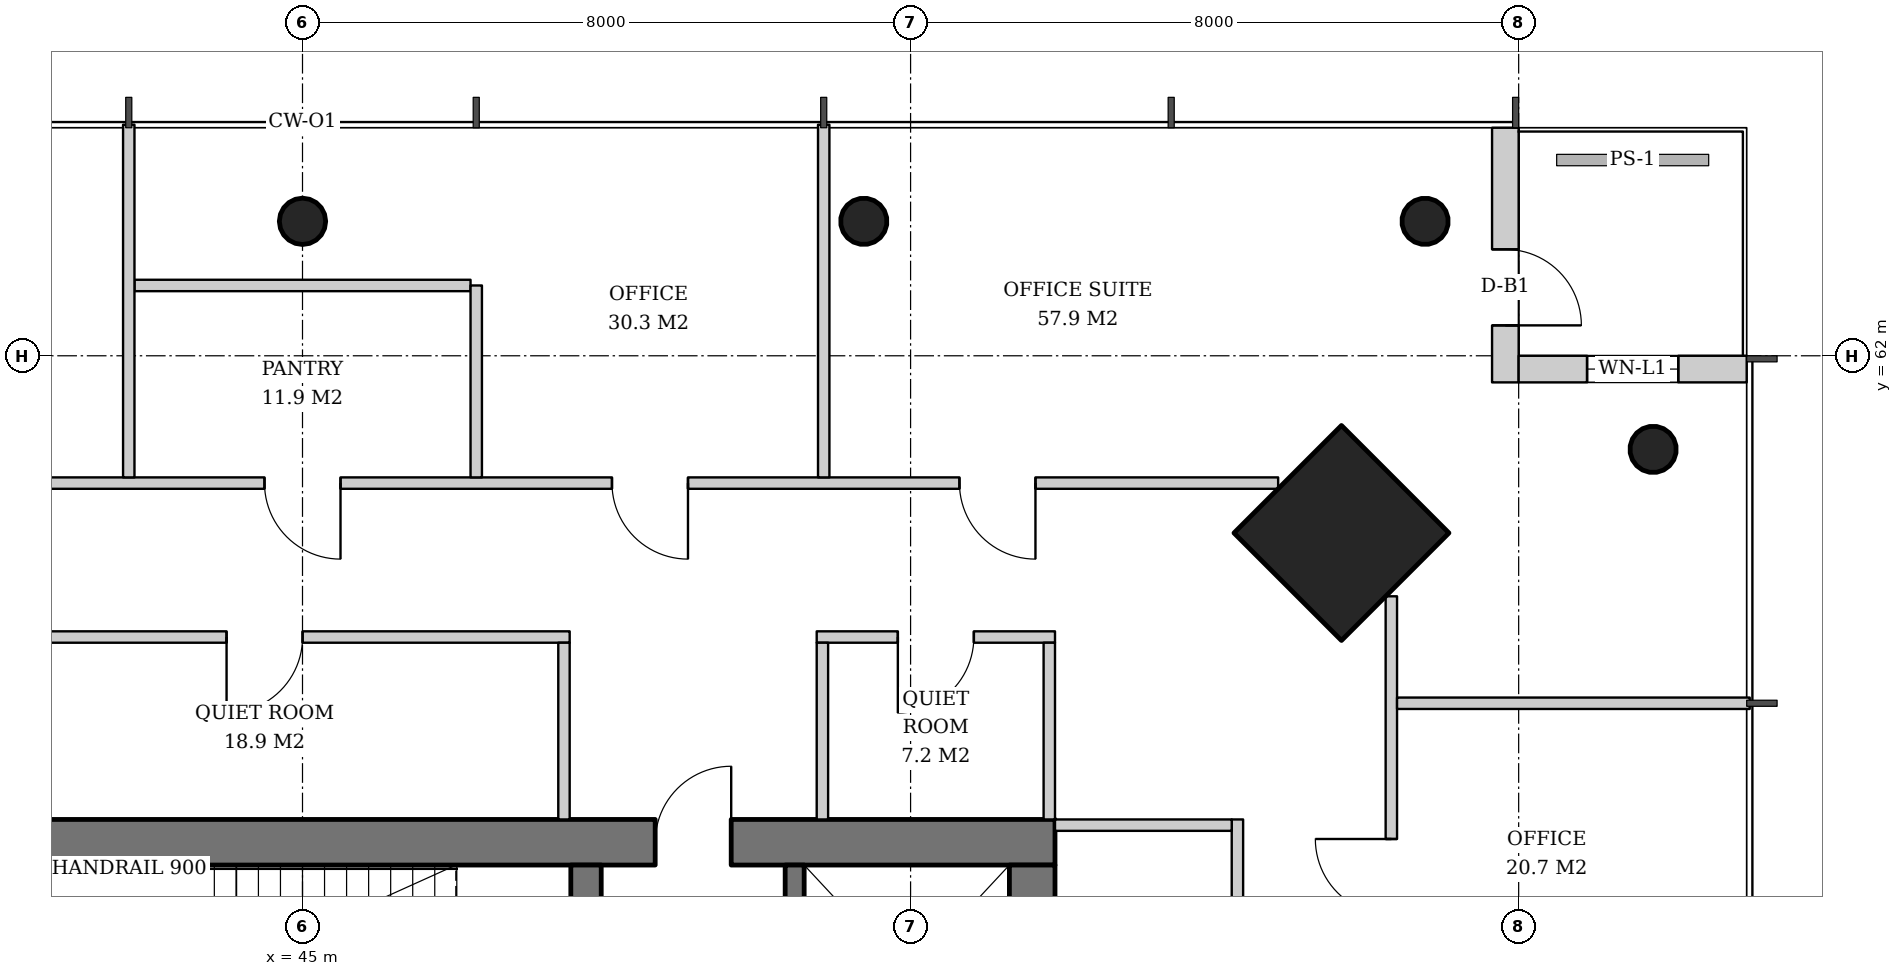
"""IFC4 building model, lengths in metres.
Left out: names, types, materials, properties, quantities, classifications, styles, units other than length and angle.
Written with IfcOpenShell. Run it as: python <this file> out.ifc"""

import sys

from ifc_helpers import new_model, si_unit, direction, frame, frame_2d, origin, origin_2d, place, context, subcontext, project, spatial, rectangle, hollow_circle, extrude, element, fill, save


model = new_model("IFC4")
c1 = context("Model", 3, precision=1e-05, world=origin(), true_north=direction((0.0, 1.0)))
c2 = subcontext(c1, "Body", "Model", "MODEL_VIEW")
j1 = project(units=[si_unit("LENGTHUNIT", "METRE"), si_unit("PLANEANGLEUNIT", "RADIAN")], contexts=[c1])
p1 = place(None, origin())
s1 = spatial("IfcSite", under=j1, at=p1, CompositionType="ELEMENT")
p2 = place(p1, origin())
s2 = spatial("IfcBuilding", under=s1, at=p2, CompositionType="ELEMENT")
p3 = place(p2, frame((0.0, 0.0, 214.8)))
s3 = spatial("IfcBuildingStorey", under=s2, at=p3, CompositionType="ELEMENT", Elevation=214.8)
p4 = place(p3, frame((58.707, 59.707, 0.0), z_axis=(-0.031898107953, -0.031898107953, 0.998981992539), x_axis=(0.707106781187, -0.707106781187, 0.0)))
e1 = element("IfcColumn", 1, at=p4, inside=s3, PredefinedType="COLUMN", context=c2, shape_type="SweptSolid", body=[
    extrude(rectangle(XDim=2.0, YDim=2.0, at=origin_2d()), origin(), (0.0, 0.0, 1.0), 3.804),
])
for number, where, z_axis, x_axis in (
    (2, (62.807, 60.807, 0.0), (-0.032, -0.032, 0.999), (0.707, -0.707, 0.0)),
    (3, (59.807, 63.807, 0.0), (-0.032, -0.032, 0.999), (0.707, -0.707, 0.0)),
):
    element("IfcColumn", number, at=place(p3, frame(where, z_axis=z_axis, x_axis=x_axis)), inside=s3, PredefinedType="COLUMN", context=c2, shape_type="SweptSolid", body=[
        extrude(hollow_circle(Radius=0.305, WallThickness=0.025, at=origin_2d()), origin(), (0.0, 0.0, 1.0), 3.804),
    ])
p5 = place(p3, frame((52.404, 63.807, 0.0), z_axis=(-0.015987237665, -0.031910269556, 0.999362868496), x_axis=(0.894067115991, -0.447933021895, 0.0)))
e4 = element("IfcColumn", 4, at=p5, inside=s3, PredefinedType="COLUMN", context=c2, shape_type="SweptSolid", body=[
    extrude(hollow_circle(Radius=0.305, WallThickness=0.025, at=origin_2d()), origin(), (0.0, 0.0, 1.0), 3.802),
])
p6 = place(p3, frame((45.0, 63.807, 0.0), z_axis=(0.0, -0.031914348339, 0.999490607445), x_axis=(1.0, 0.0, 0.0)))
e5 = element("IfcColumn", 5, at=p6, inside=s3, PredefinedType="COLUMN", context=c2, shape_type="SweptSolid", body=[
    extrude(hollow_circle(Radius=0.305, WallThickness=0.025, at=origin_2d()), origin(), (0.0, 0.0, 1.0), 3.802),
])
p7 = place(p3, frame((35.1, 55.6, 0.0), z_axis=(0.0, 0.0, 1.0), x_axis=(1.0, 0.0, 0.0)))
e6 = element("IfcWall", 6, at=p7, inside=s3, PredefinedType="SHEAR", context=c2, shape_type="SweptSolid", body=[
    extrude(rectangle(XDim=19.8, YDim=0.6, at=frame_2d((9.9, 0.0))), origin(), (0.0, 0.0, 1.0), 3.8),
])
p8 = place(p7, frame((14.54, 0.0, 0.0)))
e7 = element("IfcOpeningElement", 7, at=p8, cuts=e6, PredefinedType="OPENING", context=c2, shape_type="SweptSolid", body=[
    extrude(rectangle(XDim=1.0, YDim=2.1, at=frame_2d((0.5, 1.05))), frame((0.0, 0.31, 0.0), z_axis=(0.0, -1.0, 0.0), x_axis=(1.0, 0.0, 0.0)), (0.0, 0.0, 1.0), 0.62),
])
p9 = place(p7, frame((1.024, 0.0, 0.0)))
e8 = element("IfcOpeningElement", 8, at=p9, cuts=e6, PredefinedType="OPENING", context=c2, shape_type="SweptSolid", body=[
    extrude(rectangle(XDim=1.0, YDim=2.1, at=frame_2d((0.5, 1.05))), frame((0.0, 0.31, 0.0), z_axis=(0.0, -1.0, 0.0), x_axis=(1.0, 0.0, 0.0)), (0.0, 0.0, 1.0), 0.62),
])
p10 = place(p7, frame((3.262, 0.0, 0.0)))
e9 = element("IfcOpeningElement", 9, at=p10, cuts=e6, PredefinedType="OPENING", context=c2, shape_type="SweptSolid", body=[
    extrude(rectangle(XDim=1.0, YDim=2.1, at=frame_2d((0.5, 1.05))), frame((0.0, 0.31, 0.0), z_axis=(0.0, -1.0, 0.0), x_axis=(1.0, 0.0, 0.0)), (0.0, 0.0, 1.0), 0.62),
])
p11 = place(p3, frame((54.6, 36.7, 0.0), z_axis=(0.0, 0.0, 1.0), x_axis=(0.0, 1.0, 0.0)))
e10 = element("IfcWall", 10, at=p11, inside=s3, PredefinedType="SHEAR", context=c2, shape_type="SweptSolid", body=[
    extrude(rectangle(XDim=18.6, YDim=0.6, at=frame_2d((9.3, 0.0))), origin(), (0.0, 0.0, 1.0), 3.8),
])
p12 = place(p11, frame((8.4, 0.0, 0.0)))
e11 = element("IfcOpeningElement", 11, at=p12, cuts=e10, PredefinedType="OPENING", context=c2, shape_type="SweptSolid", body=[
    extrude(rectangle(XDim=1.8, YDim=2.4, at=frame_2d((0.9, 1.2))), frame((0.0, 0.31, 0.0), z_axis=(0.0, -1.0, 0.0), x_axis=(1.0, 0.0, 0.0)), (0.0, 0.0, 1.0), 0.62),
])
p13 = place(p3, frame((48.73, 52.4, 0.0), z_axis=(0.0, 0.0, 1.0), x_axis=(0.0, 1.0, 0.0)))
e12 = element("IfcWall", 12, at=p13, inside=s3, PredefinedType="SHEAR", context=c2, shape_type="SweptSolid", body=[
    extrude(rectangle(XDim=2.9, YDim=0.4, at=frame_2d((1.45, 0.0))), origin(), (0.0, 0.0, 1.0), 3.8),
])
p14 = place(p13, frame((0.3, 0.0, 0.0)))
e13 = element("IfcOpeningElement", 13, at=p14, cuts=e12, PredefinedType="OPENING", context=c2, shape_type="SweptSolid", body=[
    extrude(rectangle(XDim=1.0, YDim=2.1, at=frame_2d((0.5, 1.05))), frame((0.0, 0.21, 0.0), z_axis=(0.0, -1.0, 0.0), x_axis=(1.0, 0.0, 0.0)), (0.0, 0.0, 1.0), 0.42),
])
p15 = place(p3, frame((60.825, 65.0, 0.0), z_axis=(0.0, 0.0, 1.0), x_axis=(0.0, -1.0, 0.0)))
e14 = element("IfcWall", 14, at=p15, inside=s3, PredefinedType="SOLIDWALL", context=c2, shape_type="SweptSolid", body=[
    extrude(rectangle(XDim=3.35, YDim=0.35, at=frame_2d((1.675, 0.0))), origin(), (0.0, 0.0, 1.0), 3.62),
])
p16 = place(p15, frame((1.6, 0.0, 0.0)))
e15 = element("IfcOpeningElement", 15, at=p16, cuts=e14, PredefinedType="OPENING", context=c2, shape_type="SweptSolid", body=[
    extrude(rectangle(XDim=1.0, YDim=2.4, at=frame_2d((0.5, 1.2))), frame((0.0, 0.185, 0.0), z_axis=(0.0, -1.0, 0.0), x_axis=(1.0, 0.0, 0.0)), (0.0, 0.0, 1.0), 0.37),
])
p17 = place(p3, frame((61.0, 61.825, 0.0), z_axis=(0.0, 0.0, 1.0), x_axis=(1.0, 0.0, 0.0)))
e16 = element("IfcWall", 16, at=p17, inside=s3, PredefinedType="SOLIDWALL", context=c2, shape_type="SweptSolid", body=[
    extrude(rectangle(XDim=3.0, YDim=0.35, at=frame_2d((1.5, 0.0))), origin(), (0.0, 0.0, 1.0), 3.62),
])
p18 = place(p17, frame((0.9, 0.0, 0.6)))
e17 = element("IfcOpeningElement", 17, at=p18, cuts=e16, PredefinedType="OPENING", context=c2, shape_type="SweptSolid", body=[
    extrude(rectangle(XDim=1.2, YDim=2.55, at=frame_2d((0.6, 1.275))), frame((0.0, 0.185, 0.0), z_axis=(0.0, -1.0, 0.0), x_axis=(1.0, 0.0, 0.0)), (0.0, 0.0, 1.0), 0.37),
])
p19 = place(p3, frame((51.475, 52.4, 0.0), z_axis=(0.0, 0.0, 1.0), x_axis=(0.0, 1.0, 0.0)))
e18 = element("IfcWall", 18, at=p19, inside=s3, PredefinedType="SHEAR", context=c2, shape_type="SweptSolid", body=[
    extrude(rectangle(XDim=2.9, YDim=0.25, at=frame_2d((1.45, 0.0))), origin(), (0.0, 0.0, 1.0), 3.8),
])
p20 = place(p19, frame((0.8, 0.0, 0.0)))
e19 = element("IfcOpeningElement", 19, at=p20, cuts=e18, PredefinedType="OPENING", context=c2, shape_type="SweptSolid", body=[
    extrude(rectangle(XDim=1.3, YDim=2.2, at=frame_2d((0.65, 1.1))), frame((0.0, 0.135, 0.0), z_axis=(0.0, -1.0, 0.0), x_axis=(1.0, 0.0, 0.0)), (0.0, 0.0, 1.0), 0.27),
])
p21 = place(p3, frame((57.3, 48.025, 0.0), z_axis=(0.0, 0.0, 1.0), x_axis=(0.0, 1.0, 0.0)))
e20 = element("IfcWall", 20, at=p21, inside=s3, PredefinedType="PARTITIONING", context=c2, shape_type="SweptSolid", body=[
    extrude(rectangle(XDim=7.875, YDim=0.15, at=frame_2d((3.938, 0.0))), origin(), (0.0, 0.0, 1.0), 2.867),
])
p22 = place(p21, frame((3.438, 0.0, 0.0)))
e21 = element("IfcOpeningElement", 21, at=p22, cuts=e20, PredefinedType="OPENING", context=c2, shape_type="SweptSolid", body=[
    extrude(rectangle(XDim=1.0, YDim=2.1, at=frame_2d((0.5, 1.05))), frame((0.0, 0.085, 0.0), z_axis=(0.0, -1.0, 0.0), x_axis=(1.0, 0.0, 0.0)), (0.0, 0.0, 1.0), 0.17),
])
p23 = place(p3, frame((54.9, 55.825, 0.0), z_axis=(0.0, 0.0, 1.0), x_axis=(1.0, 0.0, 0.0)))
e22 = element("IfcWall", 22, at=p23, inside=s3, PredefinedType="PARTITIONING", context=c2, shape_type="SweptSolid", body=[
    extrude(rectangle(XDim=2.325, YDim=0.15, at=frame_2d((1.163, 0.0))), origin(), (0.0, 0.0, 1.0), 3.62),
])
p24 = place(p3, frame((54.9, 58.3, 0.0), z_axis=(0.0, 0.0, 1.0), x_axis=(-1.0, 0.0, 0.0)))
e23 = element("IfcWall", 23, at=p24, inside=s3, PredefinedType="PARTITIONING", context=c2, shape_type="SweptSolid", body=[
    extrude(rectangle(XDim=3.135, YDim=0.15, at=frame_2d((1.567, 0.0))), origin(), (0.0, 0.0, 1.0), 2.92),
])
p25 = place(p24, frame((1.067, 0.0, 0.0)))
e24 = element("IfcOpeningElement", 24, at=p25, cuts=e23, PredefinedType="OPENING", context=c2, shape_type="SweptSolid", body=[
    extrude(rectangle(XDim=1.0, YDim=2.1, at=frame_2d((0.5, 1.05))), frame((0.0, 0.085, 0.0), z_axis=(0.0, -1.0, 0.0), x_axis=(1.0, 0.0, 0.0)), (0.0, 0.0, 1.0), 0.17),
])
p26 = place(p3, frame((54.825, 55.9, 0.0), z_axis=(0.0, 0.0, 1.0), x_axis=(0.0, 1.0, 0.0)))
e25 = element("IfcWall", 25, at=p26, inside=s3, PredefinedType="PARTITIONING", context=c2, shape_type="SweptSolid", body=[
    extrude(rectangle(XDim=2.325, YDim=0.15, at=frame_2d((1.163, 0.0))), origin(), (0.0, 0.0, 1.0), 2.92),
])
p27 = place(p3, frame((51.84, 55.9, 0.0), z_axis=(0.0, 0.0, 1.0), x_axis=(0.0, 1.0, 0.0)))
e26 = element("IfcWall", 26, at=p27, inside=s3, PredefinedType="PARTITIONING", context=c2, shape_type="SweptSolid", body=[
    extrude(rectangle(XDim=2.325, YDim=0.15, at=frame_2d((1.163, 0.0))), origin(), (0.0, 0.0, 1.0), 3.62),
])
p28 = place(p3, frame((48.515, 58.3, 0.0), z_axis=(0.0, 0.0, 1.0), x_axis=(-1.0, 0.0, 0.0)))
e27 = element("IfcWall", 27, at=p28, inside=s3, PredefinedType="PARTITIONING", context=c2, shape_type="SweptSolid", body=[
    extrude(rectangle(XDim=8.028, YDim=0.15, at=frame_2d((4.014, 0.0))), origin(), (0.0, 0.0, 1.0), 2.867),
])
p29 = place(p28, frame((3.514, 0.0, 0.0)))
e28 = element("IfcOpeningElement", 28, at=p29, cuts=e27, PredefinedType="OPENING", context=c2, shape_type="SweptSolid", body=[
    extrude(rectangle(XDim=1.0, YDim=2.1, at=frame_2d((0.5, 1.05))), frame((0.0, 0.085, 0.0), z_axis=(0.0, -1.0, 0.0), x_axis=(1.0, 0.0, 0.0)), (0.0, 0.0, 1.0), 0.17),
])
p30 = place(p3, frame((48.44, 55.9, 0.0), z_axis=(0.0, 0.0, 1.0), x_axis=(0.0, 1.0, 0.0)))
e29 = element("IfcWall", 29, at=p30, inside=s3, PredefinedType="PARTITIONING", context=c2, shape_type="SweptSolid", body=[
    extrude(rectangle(XDim=2.325, YDim=0.15, at=frame_2d((1.163, 0.0))), origin(), (0.0, 0.0, 1.0), 3.62),
])
p31 = place(p3, frame((59.325, 33.164, 0.0), z_axis=(0.0, 0.0, 1.0), x_axis=(0.0, 1.0, 0.0)))
e30 = element("IfcWall", 30, at=p31, inside=s3, PredefinedType="PARTITIONING", context=c2, shape_type="SweptSolid", body=[
    extrude(rectangle(XDim=25.671, YDim=0.15, at=frame_2d((12.836, 0.0))), origin(), (0.0, 0.0, 1.0), 2.867),
])
p32 = place(p31, frame((3.193, 0.0, 0.0)))
e31 = element("IfcOpeningElement", 31, at=p32, cuts=e30, PredefinedType="OPENING", context=c2, shape_type="SweptSolid", body=[
    extrude(rectangle(XDim=1.0, YDim=2.1, at=frame_2d((0.5, 1.05))), frame((0.0, 0.085, 0.0), z_axis=(0.0, -1.0, 0.0), x_axis=(1.0, 0.0, 0.0)), (0.0, 0.0, 1.0), 0.17),
])
p33 = place(p31, frame((7.764, 0.0, 0.0)))
e32 = element("IfcOpeningElement", 32, at=p33, cuts=e30, PredefinedType="OPENING", context=c2, shape_type="SweptSolid", body=[
    extrude(rectangle(XDim=1.0, YDim=2.1, at=frame_2d((0.5, 1.05))), frame((0.0, 0.085, 0.0), z_axis=(0.0, -1.0, 0.0), x_axis=(1.0, 0.0, 0.0)), (0.0, 0.0, 1.0), 0.17),
])
p34 = place(p31, frame((12.336, 0.0, 0.0)))
e33 = element("IfcOpeningElement", 33, at=p34, cuts=e30, PredefinedType="OPENING", context=c2, shape_type="SweptSolid", body=[
    extrude(rectangle(XDim=1.0, YDim=2.1, at=frame_2d((0.5, 1.05))), frame((0.0, 0.085, 0.0), z_axis=(0.0, -1.0, 0.0), x_axis=(1.0, 0.0, 0.0)), (0.0, 0.0, 1.0), 0.17),
])
p35 = place(p31, frame((16.907, 0.0, 0.0)))
e34 = element("IfcOpeningElement", 34, at=p35, cuts=e30, PredefinedType="OPENING", context=c2, shape_type="SweptSolid", body=[
    extrude(rectangle(XDim=1.0, YDim=2.1, at=frame_2d((0.5, 1.05))), frame((0.0, 0.085, 0.0), z_axis=(0.0, -1.0, 0.0), x_axis=(1.0, 0.0, 0.0)), (0.0, 0.0, 1.0), 0.17),
])
p36 = place(p31, frame((21.479, 0.0, 0.0)))
e35 = element("IfcOpeningElement", 35, at=p36, cuts=e30, PredefinedType="OPENING", context=c2, shape_type="SweptSolid", body=[
    extrude(rectangle(XDim=1.0, YDim=2.1, at=frame_2d((0.5, 1.05))), frame((0.0, 0.085, 0.0), z_axis=(0.0, -1.0, 0.0), x_axis=(1.0, 0.0, 0.0)), (0.0, 0.0, 1.0), 0.17),
])
p37 = place(p3, frame((59.4, 57.428, 0.0), z_axis=(0.0, 0.0, 1.0), x_axis=(1.0, 0.0, 0.0)))
e36 = element("IfcWall", 36, at=p37, inside=s3, PredefinedType="PARTITIONING", context=c2, shape_type="SweptSolid", body=[
    extrude(rectangle(XDim=4.64, YDim=0.15, at=frame_2d((2.32, 0.0))), origin(), (0.0, 0.0, 1.0), 3.12),
])
p38 = place(p3, frame((47.211, 62.925, 0.0), z_axis=(0.0, 0.0, 1.0), x_axis=(-1.0, 0.0, 0.0)))
e37 = element("IfcWall", 37, at=p38, inside=s3, PredefinedType="PARTITIONING", context=c2, shape_type="SweptSolid", body=[
    extrude(rectangle(XDim=4.421, YDim=0.15, at=frame_2d((2.211, 0.0))), origin(), (0.0, 0.0, 1.0), 2.867),
])
p39 = place(p3, frame((57.836, 60.325, 0.0), z_axis=(0.0, 0.0, 1.0), x_axis=(-1.0, 0.0, 0.0)))
e38 = element("IfcWall", 38, at=p39, inside=s3, PredefinedType="PARTITIONING", context=c2, shape_type="SweptSolid", body=[
    extrude(rectangle(XDim=25.671, YDim=0.15, at=frame_2d((12.836, 0.0))), origin(), (0.0, 0.0, 1.0), 2.867),
])
p40 = place(p39, frame((3.193, 0.0, 0.0)))
e39 = element("IfcOpeningElement", 39, at=p40, cuts=e38, PredefinedType="OPENING", context=c2, shape_type="SweptSolid", body=[
    extrude(rectangle(XDim=1.0, YDim=2.1, at=frame_2d((0.5, 1.05))), frame((0.0, 0.085, 0.0), z_axis=(0.0, -1.0, 0.0), x_axis=(1.0, 0.0, 0.0)), (0.0, 0.0, 1.0), 0.17),
])
p41 = place(p39, frame((7.764, 0.0, 0.0)))
e40 = element("IfcOpeningElement", 40, at=p41, cuts=e38, PredefinedType="OPENING", context=c2, shape_type="SweptSolid", body=[
    extrude(rectangle(XDim=1.0, YDim=2.1, at=frame_2d((0.5, 1.05))), frame((0.0, 0.085, 0.0), z_axis=(0.0, -1.0, 0.0), x_axis=(1.0, 0.0, 0.0)), (0.0, 0.0, 1.0), 0.17),
])
p42 = place(p39, frame((12.336, 0.0, 0.0)))
e41 = element("IfcOpeningElement", 41, at=p42, cuts=e38, PredefinedType="OPENING", context=c2, shape_type="SweptSolid", body=[
    extrude(rectangle(XDim=1.0, YDim=2.1, at=frame_2d((0.5, 1.05))), frame((0.0, 0.085, 0.0), z_axis=(0.0, -1.0, 0.0), x_axis=(1.0, 0.0, 0.0)), (0.0, 0.0, 1.0), 0.17),
])
p43 = place(p39, frame((16.907, 0.0, 0.0)))
e42 = element("IfcOpeningElement", 42, at=p43, cuts=e38, PredefinedType="OPENING", context=c2, shape_type="SweptSolid", body=[
    extrude(rectangle(XDim=1.0, YDim=2.1, at=frame_2d((0.5, 1.05))), frame((0.0, 0.085, 0.0), z_axis=(0.0, -1.0, 0.0), x_axis=(1.0, 0.0, 0.0)), (0.0, 0.0, 1.0), 0.17),
])
p44 = place(p3, frame((51.857, 60.4, 0.0), z_axis=(0.0, 0.0, 1.0), x_axis=(0.0, 1.0, 0.0)))
e43 = element("IfcWall", 43, at=p44, inside=s3, PredefinedType="PARTITIONING", context=c2, shape_type="SweptSolid", body=[
    extrude(rectangle(XDim=4.64, YDim=0.15, at=frame_2d((2.32, 0.0))), origin(), (0.0, 0.0, 1.0), 3.12),
])
p45 = place(p3, frame((47.286, 60.4, 0.0), z_axis=(0.0, 0.0, 1.0), x_axis=(0.0, 1.0, 0.0)))
e44 = element("IfcWall", 44, at=p45, inside=s3, PredefinedType="PARTITIONING", context=c2, shape_type="SweptSolid", body=[
    extrude(rectangle(XDim=2.525, YDim=0.15, at=frame_2d((1.263, 0.0))), origin(), (0.0, 0.0, 1.0), 3.62),
])
p46 = place(p3, frame((42.714, 60.4, 0.0), z_axis=(0.0, 0.0, 1.0), x_axis=(0.0, 1.0, 0.0)))
e45 = element("IfcWall", 45, at=p46, inside=s3, PredefinedType="PARTITIONING", context=c2, shape_type="SweptSolid", body=[
    extrude(rectangle(XDim=4.64, YDim=0.15, at=frame_2d((2.32, 0.0))), origin(), (0.0, 0.0, 1.0), 3.12),
])
p47 = place(p16, origin())
e46 = element("IfcDoor", 46, at=p47, inside=s3, OperationType="SINGLE_SWING_RIGHT", PredefinedType="DOOR", context=c2, shape_type="SweptSolid", body=[
    extrude(rectangle(XDim=1.0, YDim=2.4, at=frame_2d((0.5, 1.2))), frame((0.0, 0.025, 0.0), z_axis=(0.0, -1.0, 0.0), x_axis=(1.0, 0.0, 0.0)), (0.0, 0.0, 1.0), 0.05),
])
fill(e15, e46)
p48 = place(p18, origin())
e47 = element("IfcWindow", 47, at=p48, inside=s3, PartitioningType="SINGLE_PANEL", PredefinedType="WINDOW", context=c2, shape_type="SweptSolid", body=[
    extrude(rectangle(XDim=1.2, YDim=2.55, at=frame_2d((0.6, 1.275))), frame((0.0, 0.03, 0.0), z_axis=(0.0, -1.0, 0.0), x_axis=(1.0, 0.0, 0.0)), (0.0, 0.0, 1.0), 0.06),
])
fill(e17, e47)
p49 = place(p8, origin())
e48 = element("IfcDoor", 48, at=p49, inside=s3, OperationType="SINGLE_SWING_RIGHT", PredefinedType="DOOR", context=c2, shape_type="SweptSolid", body=[
    extrude(rectangle(XDim=1.0, YDim=2.1, at=frame_2d((0.5, 1.05))), frame((0.0, 0.025, 0.0), z_axis=(0.0, -1.0, 0.0), x_axis=(1.0, 0.0, 0.0)), (0.0, 0.0, 1.0), 0.05),
])
fill(e7, e48)
p50 = place(p25, origin())
e49 = element("IfcDoor", 49, at=p50, inside=s3, OperationType="SINGLE_SWING_RIGHT", PredefinedType="DOOR", context=c2, shape_type="SweptSolid", body=[
    extrude(rectangle(XDim=1.0, YDim=2.1, at=frame_2d((0.5, 1.05))), frame((0.0, 0.025, 0.0), z_axis=(0.0, -1.0, 0.0), x_axis=(1.0, 0.0, 0.0)), (0.0, 0.0, 1.0), 0.05),
])
fill(e24, e49)
p51 = place(p29, origin())
e50 = element("IfcDoor", 50, at=p51, inside=s3, OperationType="SINGLE_SWING_RIGHT", PredefinedType="DOOR", context=c2, shape_type="SweptSolid", body=[
    extrude(rectangle(XDim=1.0, YDim=2.1, at=frame_2d((0.5, 1.05))), frame((0.0, 0.025, 0.0), z_axis=(0.0, -1.0, 0.0), x_axis=(1.0, 0.0, 0.0)), (0.0, 0.0, 1.0), 0.05),
])
fill(e28, e50)
p52 = place(p36, origin())
e51 = element("IfcDoor", 51, at=p52, inside=s3, OperationType="SINGLE_SWING_RIGHT", PredefinedType="DOOR", context=c2, shape_type="SweptSolid", body=[
    extrude(rectangle(XDim=1.0, YDim=2.1, at=frame_2d((0.5, 1.05))), frame((0.0, 0.025, 0.0), z_axis=(0.0, -1.0, 0.0), x_axis=(1.0, 0.0, 0.0)), (0.0, 0.0, 1.0), 0.05),
])
fill(e35, e51)
p53 = place(p40, origin())
e52 = element("IfcDoor", 52, at=p53, inside=s3, OperationType="SINGLE_SWING_LEFT", PredefinedType="DOOR", context=c2, shape_type="SweptSolid", body=[
    extrude(rectangle(XDim=1.0, YDim=2.1, at=frame_2d((0.5, 1.05))), frame((0.0, 0.025, 0.0), z_axis=(0.0, -1.0, 0.0), x_axis=(1.0, 0.0, 0.0)), (0.0, 0.0, 1.0), 0.05),
])
fill(e39, e52)
p54 = place(p41, origin())
e53 = element("IfcDoor", 53, at=p54, inside=s3, OperationType="SINGLE_SWING_LEFT", PredefinedType="DOOR", context=c2, shape_type="SweptSolid", body=[
    extrude(rectangle(XDim=1.0, YDim=2.1, at=frame_2d((0.5, 1.05))), frame((0.0, 0.025, 0.0), z_axis=(0.0, -1.0, 0.0), x_axis=(1.0, 0.0, 0.0)), (0.0, 0.0, 1.0), 0.05),
])
fill(e40, e53)
p55 = place(p42, origin())
e54 = element("IfcDoor", 54, at=p55, inside=s3, OperationType="SINGLE_SWING_LEFT", PredefinedType="DOOR", context=c2, shape_type="SweptSolid", body=[
    extrude(rectangle(XDim=1.0, YDim=2.1, at=frame_2d((0.5, 1.05))), frame((0.0, 0.025, 0.0), z_axis=(0.0, -1.0, 0.0), x_axis=(1.0, 0.0, 0.0)), (0.0, 0.0, 1.0), 0.05),
])
fill(e41, e54)
save(model, sys.argv[1])
